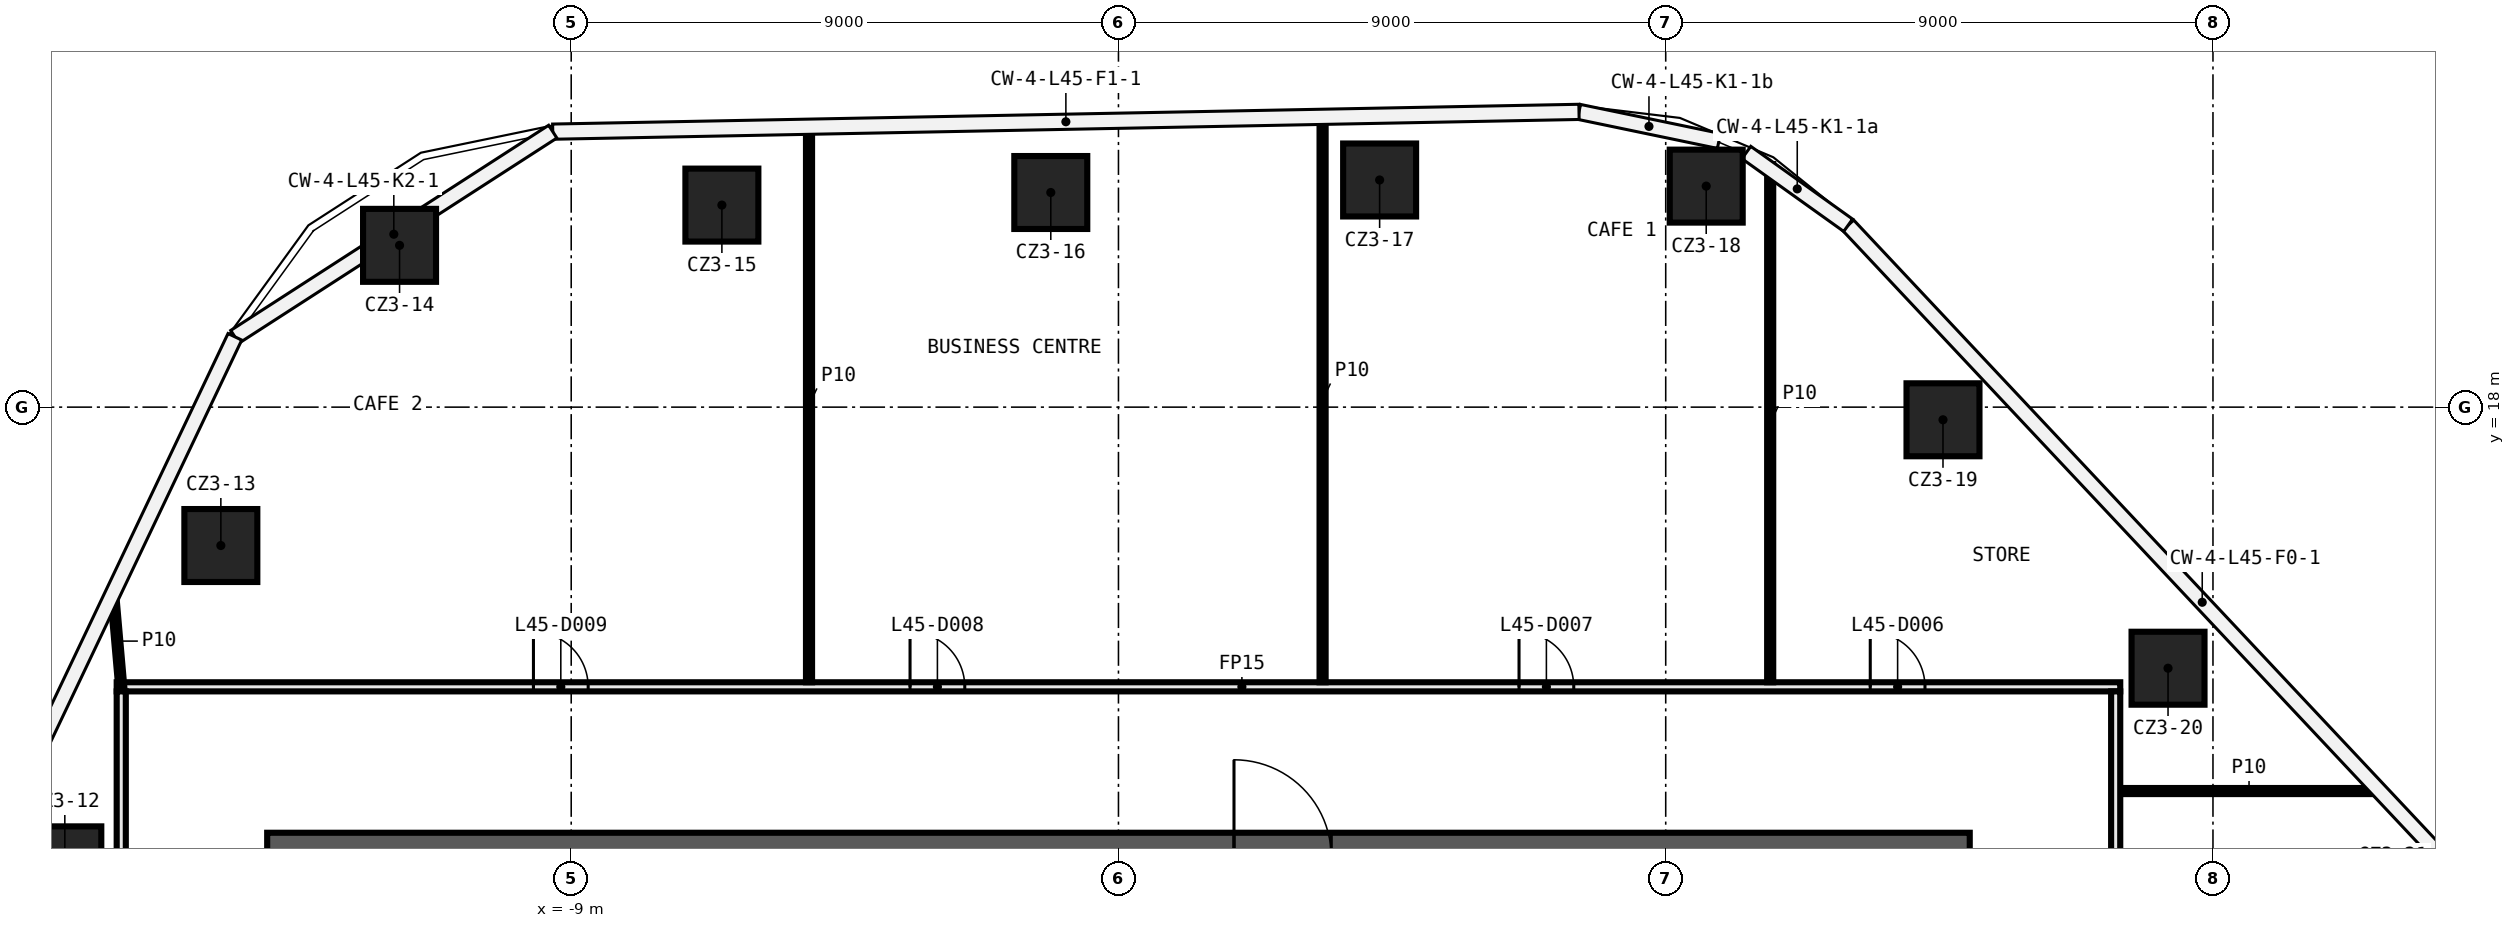
"""IFC4 building model, lengths in metres.
Left out: names, types, materials, properties, quantities, classifications, styles, units other than length and angle.
Written with IfcOpenShell. Run it as: python <this file> out.ifc"""

import sys

from ifc_helpers import new_model, si_unit, direction, frame, frame_2d, origin, origin_2d, place, context, subcontext, project, spatial, rectangle, extrude, element, fill, save


model = new_model("IFC4")
c1 = context("Model", 3, precision=1e-05, world=origin(), true_north=direction((0.0, 1.0)))
c2 = subcontext(c1, "Body", "Model", "MODEL_VIEW")
j1 = project(units=[si_unit("LENGTHUNIT", "METRE"), si_unit("PLANEANGLEUNIT", "RADIAN")], contexts=[c1])
p1 = place(None, origin())
s1 = spatial("IfcSite", under=j1, at=p1, CompositionType="ELEMENT")
p2 = place(p1, origin())
s2 = spatial("IfcBuilding", under=s1, at=p2, CompositionType="ELEMENT")
p3 = place(p2, frame((0.0, 0.0, 215.6)))
s3 = spatial("IfcBuildingStorey", under=s2, at=p3, CompositionType="ELEMENT", Elevation=215.6)
for number, where, z_axis, x_axis in (
    (1, (-17.328, 10.505, 0.0), (0.0, 0.0, 1.0), (1.0, 0.0, 0.0)),
    (2, (-14.762, 15.724, 0.0), (0.0, 0.0, 1.0), (1.0, 0.0, 0.0)),
    (3, (-11.823, 20.661, 0.0), (0.0, 0.0, 1.0), (1.0, 0.0, 0.0)),
    (4, (-6.522, 21.323, 0.0), (0.0, 0.0, 1.0), (1.0, 0.0, 0.0)),
    (5, (-1.113, 21.53, 0.0), (0.0, 0.0, 1.0), (1.0, 0.0, 0.0)),
    (6, (4.295, 21.736, 0.0), (0.0, 0.0, 1.0), (1.0, 0.0, 0.0)),
    (7, (9.666, 21.635, 0.0), (0.0, 0.0, 1.0), (1.0, 0.0, 0.0)),
    (8, (13.56, 17.792, 0.0), (0.0, 0.0, 1.0), (1.0, 0.0, 0.0)),
    (9, (17.261, 13.706, 0.0), (0.0, 0.0, 1.0), (1.0, 0.0, 0.0)),
):
    element("IfcColumn", number, at=place(p3, frame(where, z_axis=z_axis, x_axis=x_axis)), inside=s3, PredefinedType="COLUMN", context=c2, shape_type="SweptSolid", body=[
        extrude(rectangle(XDim=1.2, YDim=1.2, at=origin_2d()), origin(), (0.0, 0.0, 1.0), 4.4),
    ])
p4 = place(p3, frame((16.475, 11.686, 0.0), z_axis=(0.0, 0.0, 1.0), x_axis=(1.0, 0.0, 0.0)))
e10 = element("IfcWall", 10, at=p4, inside=s3, PredefinedType="PARTITIONING", context=c2, shape_type="SweptSolid", body=[
    extrude(rectangle(XDim=4.237, YDim=0.1, at=frame_2d((2.118, 0.0))), origin(), (0.0, 0.0, 1.0), 4.4),
])
p5 = place(p3, frame((-16.475, 13.4, 0.0), z_axis=(0.0, 0.0, 1.0), x_axis=(1.0, 0.0, 0.0)))
e11 = element("IfcWall", 11, at=p5, inside=s3, PredefinedType="PARTITIONING", context=c2, shape_type="SweptSolid", body=[
    extrude(rectangle(XDim=32.95, YDim=0.15, at=frame_2d((16.475, 0.0))), origin(), (0.0, 0.0, 1.0), 4.4),
])
p6 = place(p5, frame((28.839, 0.0, 0.0)))
e12 = element("IfcOpeningElement", 12, at=p6, cuts=e11, PredefinedType="OPENING", context=c2, shape_type="SweptSolid", body=[
    extrude(rectangle(XDim=0.9, YDim=2.1, at=frame_2d((0.45, 1.05))), frame((0.0, 0.085, 0.0), z_axis=(0.0, -1.0, 0.0), x_axis=(1.0, 0.0, 0.0)), (0.0, 0.0, 1.0), 0.17),
])
p7 = place(p5, frame((23.062, 0.0, 0.0)))
e13 = element("IfcOpeningElement", 13, at=p7, cuts=e11, PredefinedType="OPENING", context=c2, shape_type="SweptSolid", body=[
    extrude(rectangle(XDim=0.9, YDim=2.1, at=frame_2d((0.45, 1.05))), frame((0.0, 0.085, 0.0), z_axis=(0.0, -1.0, 0.0), x_axis=(1.0, 0.0, 0.0)), (0.0, 0.0, 1.0), 0.17),
])
p8 = place(p5, frame((13.047, 0.0, 0.0)))
e14 = element("IfcOpeningElement", 14, at=p8, cuts=e11, PredefinedType="OPENING", context=c2, shape_type="SweptSolid", body=[
    extrude(rectangle(XDim=0.9, YDim=2.1, at=frame_2d((0.45, 1.05))), frame((0.0, 0.085, 0.0), z_axis=(0.0, -1.0, 0.0), x_axis=(1.0, 0.0, 0.0)), (0.0, 0.0, 1.0), 0.17),
])
p9 = place(p5, frame((6.854, 0.0, 0.0)))
e15 = element("IfcOpeningElement", 15, at=p9, cuts=e11, PredefinedType="OPENING", context=c2, shape_type="SweptSolid", body=[
    extrude(rectangle(XDim=0.9, YDim=2.1, at=frame_2d((0.45, 1.05))), frame((0.0, 0.085, 0.0), z_axis=(0.0, -1.0, 0.0), x_axis=(1.0, 0.0, 0.0)), (0.0, 0.0, 1.0), 0.17),
])
p10 = place(p3, frame((16.4, 13.325, 0.0), z_axis=(0.0, 0.0, 1.0), x_axis=(0.0, -1.0, 0.0)))
e16 = element("IfcWall", 16, at=p10, inside=s3, PredefinedType="PARTITIONING", context=c2, shape_type="SweptSolid", body=[
    extrude(rectangle(XDim=26.65, YDim=0.15, at=frame_2d((13.325, 0.0))), origin(), (0.0, 0.0, 1.0), 4.4),
])
p11 = place(p10, frame((11.866, 0.0, 0.0)))
e17 = element("IfcOpeningElement", 17, at=p11, cuts=e16, PredefinedType="OPENING", context=c2, shape_type="SweptSolid", body=[
    extrude(rectangle(XDim=0.9, YDim=2.1, at=frame_2d((0.45, 1.05))), frame((0.0, 0.085, 0.0), z_axis=(0.0, -1.0, 0.0), x_axis=(1.0, 0.0, 0.0)), (0.0, 0.0, 1.0), 0.17),
])
p12 = place(p10, frame((4.905, 0.0, 0.0)))
e18 = element("IfcOpeningElement", 18, at=p12, cuts=e16, PredefinedType="OPENING", context=c2, shape_type="SweptSolid", body=[
    extrude(rectangle(XDim=0.9, YDim=2.1, at=frame_2d((0.45, 1.05))), frame((0.0, 0.085, 0.0), z_axis=(0.0, -1.0, 0.0), x_axis=(1.0, 0.0, 0.0)), (0.0, 0.0, 1.0), 0.17),
])
p13 = place(p3, frame((10.718, 13.475, 0.0), z_axis=(0.0, 0.0, 1.0), x_axis=(0.0, 1.0, 0.0)))
e19 = element("IfcWall", 19, at=p13, inside=s3, PredefinedType="PARTITIONING", context=c2, shape_type="SweptSolid", body=[
    extrude(rectangle(XDim=8.522, YDim=0.1, at=frame_2d((4.261, 0.0))), origin(), (0.0, 0.0, 1.0), 4.4),
])
p14 = place(p3, frame((3.357, 13.475, 0.0), z_axis=(0.0, 0.0, 1.0), x_axis=(0.0, 1.0, 0.0)))
e20 = element("IfcWall", 20, at=p14, inside=s3, PredefinedType="PARTITIONING", context=c2, shape_type="SweptSolid", body=[
    extrude(rectangle(XDim=9.28, YDim=0.1, at=frame_2d((4.64, 0.0))), origin(), (0.0, 0.0, 1.0), 4.4),
])
p15 = place(p3, frame((-5.089, 13.475, 0.0), z_axis=(0.0, 0.0, 1.0), x_axis=(0.0, 1.0, 0.0)))
e21 = element("IfcWall", 21, at=p15, inside=s3, PredefinedType="PARTITIONING", context=c2, shape_type="SweptSolid", body=[
    extrude(rectangle(XDim=9.117, YDim=0.1, at=frame_2d((4.559, 0.0))), origin(), (0.0, 0.0, 1.0), 4.4),
])
p16 = place(p3, frame((-16.4, -13.325, 0.0), z_axis=(0.0, 0.0, 1.0), x_axis=(0.0, 1.0, 0.0)))
e22 = element("IfcWall", 22, at=p16, inside=s3, PredefinedType="PARTITIONING", context=c2, shape_type="SweptSolid", body=[
    extrude(rectangle(XDim=26.65, YDim=0.15, at=frame_2d((13.325, 0.0))), origin(), (0.0, 0.0, 1.0), 4.4),
])
p17 = place(p16, frame((4.962, 0.0, 0.0)))
e23 = element("IfcOpeningElement", 23, at=p17, cuts=e22, PredefinedType="OPENING", context=c2, shape_type="SweptSolid", body=[
    extrude(rectangle(XDim=0.9, YDim=2.1, at=frame_2d((0.45, 1.05))), frame((0.0, 0.085, 0.0), z_axis=(0.0, -1.0, 0.0), x_axis=(1.0, 0.0, 0.0)), (0.0, 0.0, 1.0), 0.17),
])
p18 = place(p3, frame((-16.531, 14.904, 0.0), z_axis=(0.0, 0.0, 1.0), x_axis=(0.086992440638, -0.996208971688, 0.0)))
e24 = element("IfcWall", 24, at=p18, inside=s3, PredefinedType="PARTITIONING", context=c2, shape_type="SweptSolid", body=[
    extrude(rectangle(XDim=1.51, YDim=0.1, at=frame_2d((0.755, 0.0))), origin(), (0.0, 0.0, 1.0), 4.4),
])
p19 = place(p3, frame((-14.0, 10.6, 0.0), z_axis=(0.0, 0.0, 1.0), x_axis=(1.0, 0.0, 0.0)))
e25 = element("IfcWall", 25, at=p19, inside=s3, PredefinedType="SHEAR", context=c2, shape_type="SweptSolid", body=[
    extrude(rectangle(XDim=28.0, YDim=0.8, at=frame_2d((14.0, 0.0))), origin(), (0.0, 0.0, 1.0), 4.4),
])
p20 = place(p19, frame((15.9, 0.0, 0.0)))
e26 = element("IfcOpeningElement", 26, at=p20, cuts=e25, PredefinedType="OPENING", context=c2, shape_type="SweptSolid", body=[
    extrude(rectangle(XDim=1.6, YDim=2.1, at=frame_2d((0.8, 1.05))), frame((0.0, 0.41, 0.0), z_axis=(0.0, -1.0, 0.0), x_axis=(1.0, 0.0, 0.0)), (0.0, 0.0, 1.0), 0.82),
])
p21 = place(p6, origin())
e27 = element("IfcDoor", 27, at=p21, inside=s3, OperationType="SINGLE_SWING_LEFT", PredefinedType="DOOR", context=c2, shape_type="SweptSolid", body=[
    extrude(rectangle(XDim=0.9, YDim=2.1, at=frame_2d((0.45, 1.05))), frame((0.0, 0.025, 0.0), z_axis=(0.0, -1.0, 0.0), x_axis=(1.0, 0.0, 0.0)), (0.0, 0.0, 1.0), 0.05),
])
fill(e12, e27)
p22 = place(p7, origin())
e28 = element("IfcDoor", 28, at=p22, inside=s3, OperationType="SINGLE_SWING_RIGHT", PredefinedType="DOOR", context=c2, shape_type="SweptSolid", body=[
    extrude(rectangle(XDim=0.9, YDim=2.1, at=frame_2d((0.45, 1.05))), frame((0.0, 0.025, 0.0), z_axis=(0.0, -1.0, 0.0), x_axis=(1.0, 0.0, 0.0)), (0.0, 0.0, 1.0), 0.05),
])
fill(e13, e28)
p23 = place(p8, origin())
e29 = element("IfcDoor", 29, at=p23, inside=s3, OperationType="SINGLE_SWING_LEFT", PredefinedType="DOOR", context=c2, shape_type="SweptSolid", body=[
    extrude(rectangle(XDim=0.9, YDim=2.1, at=frame_2d((0.45, 1.05))), frame((0.0, 0.025, 0.0), z_axis=(0.0, -1.0, 0.0), x_axis=(1.0, 0.0, 0.0)), (0.0, 0.0, 1.0), 0.05),
])
fill(e14, e29)
p24 = place(p9, origin())
e30 = element("IfcDoor", 30, at=p24, inside=s3, OperationType="SINGLE_SWING_RIGHT", PredefinedType="DOOR", context=c2, shape_type="SweptSolid", body=[
    extrude(rectangle(XDim=0.9, YDim=2.1, at=frame_2d((0.45, 1.05))), frame((0.0, 0.025, 0.0), z_axis=(0.0, -1.0, 0.0), x_axis=(1.0, 0.0, 0.0)), (0.0, 0.0, 1.0), 0.05),
])
fill(e15, e30)
save(model, sys.argv[1])
